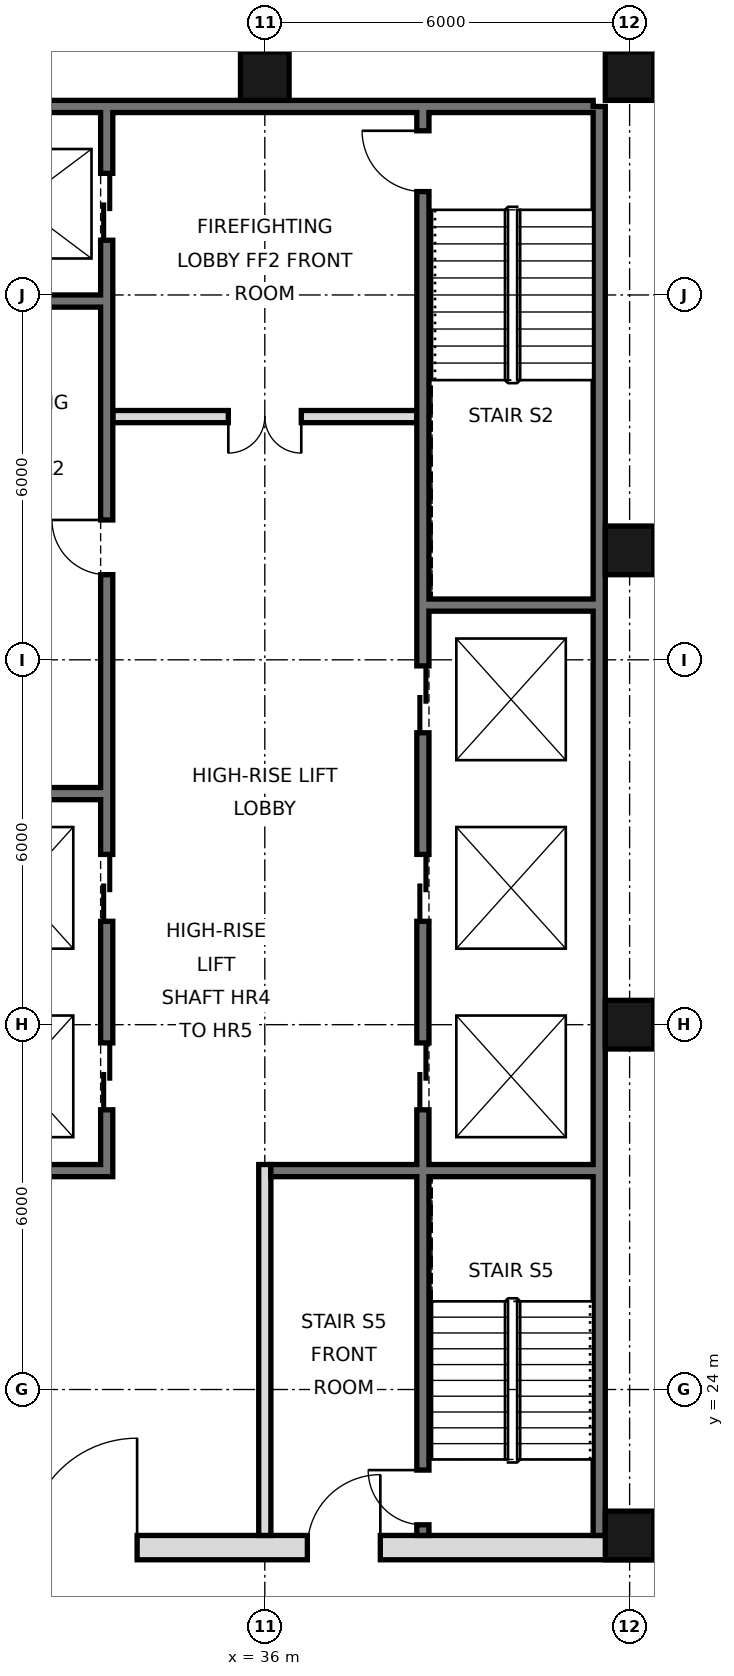
"""IFC4 building model, lengths in metres.
Left out: names, types, materials, properties, quantities, classifications, styles, units other than length and angle.
Written with IfcOpenShell. Run it as: python <this file> out.ifc"""

import sys

from ifc_helpers import new_model, si_unit, direction, frame, frame_2d, origin, origin_2d, place, context, subcontext, project, spatial, rectangle, hollow_rectangle, extrude, element, fill, save


model = new_model("IFC4")
c1 = context("Model", 3, precision=1e-05, world=origin(), true_north=direction((0.0, 1.0)))
c2 = subcontext(c1, "Body", "Model", "MODEL_VIEW")
j1 = project(units=[si_unit("LENGTHUNIT", "METRE"), si_unit("PLANEANGLEUNIT", "RADIAN")], contexts=[c1])
p1 = place(None, origin())
s1 = spatial("IfcSite", under=j1, at=p1, CompositionType="ELEMENT")
p2 = place(p1, origin())
s2 = spatial("IfcBuilding", under=s1, at=p2, CompositionType="ELEMENT")
p3 = place(p2, frame((0.0, 0.0, 219.0)))
s3 = spatial("IfcBuildingStorey", under=s2, at=p3, CompositionType="ELEMENT", Elevation=219.0)
for number, where, z_axis, x_axis in (
    (1, (36.0, 45.6, 0.0), (0.0, 0.0, 1.0), (1.0, 0.0, 0.0)),
    (2, (42.0, 21.6, 0.0), (0.0, 0.0, 1.0), (1.0, 0.0, 0.0)),
    (3, (42.0, 30.0, 0.0), (0.0, 0.0, 1.0), (1.0, 0.0, 0.0)),
    (4, (42.0, 37.8, 0.0), (0.0, 0.0, 1.0), (1.0, 0.0, 0.0)),
    (5, (42.0, 45.6, 0.0), (0.0, 0.0, 1.0), (1.0, 0.0, 0.0)),
):
    element("IfcColumn", number, at=place(p3, frame(where, z_axis=z_axis, x_axis=x_axis)), inside=s3, PredefinedType="COLUMN", context=c2, shape_type="SweptSolid", body=[
        extrude(hollow_rectangle(XDim=0.8, YDim=0.8, WallThickness=0.04, at=origin_2d()), origin(), (0.0, 0.0, 1.0), 3.6),
    ])
p4 = place(p3, frame((41.5, 21.6, 0.0), z_axis=(0.0, 0.0, 1.0), x_axis=(0.0, 1.0, 0.0)))
e6 = element("IfcWall", 6, at=p4, inside=s3, PredefinedType="SOLIDWALL", context=c2, shape_type="SweptSolid", body=[
    extrude(rectangle(XDim=23.5, YDim=0.2, at=frame_2d((11.75, 0.0))), origin(), (0.0, 0.0, 1.0), 3.42),
])
p5 = place(p3, frame((6.6, 45.1, 0.0), z_axis=(0.0, 0.0, 1.0), x_axis=(1.0, 0.0, 0.0)))
e7 = element("IfcWall", 7, at=p5, inside=s3, PredefinedType="SOLIDWALL", context=c2, shape_type="SweptSolid", body=[
    extrude(rectangle(XDim=34.8, YDim=0.2, at=frame_2d((17.4, 0.0))), origin(), (0.0, 0.0, 1.0), 3.42),
])
p6 = place(p3, frame((5.6, 21.4, 0.0), z_axis=(0.0, 0.0, 1.0), x_axis=(1.0, 0.0, 0.0)))
e8 = element("IfcWall", 8, at=p6, inside=s3, PredefinedType="SOLIDWALL", context=c2, shape_type="SweptSolid", body=[
    extrude(rectangle(XDim=36.8, YDim=0.4, at=frame_2d((18.4, 0.0))), origin(), (0.0, 0.0, 1.0), 3.42),
])
p7 = place(p6, frame((8.5, 0.0, 0.0)))
e9 = element("IfcOpeningElement", 9, at=p7, cuts=e8, PredefinedType="OPENING", context=c2, shape_type="SweptSolid", body=[
    extrude(rectangle(XDim=1.8, YDim=2.1, at=frame_2d((0.9, 1.05))), frame((0.0, 0.21, 0.0), z_axis=(0.0, -1.0, 0.0), x_axis=(1.0, 0.0, 0.0)), (0.0, 0.0, 1.0), 0.42),
])
p8 = place(p6, frame((17.5, 0.0, 0.0)))
e10 = element("IfcOpeningElement", 10, at=p8, cuts=e8, PredefinedType="OPENING", context=c2, shape_type="SweptSolid", body=[
    extrude(rectangle(XDim=1.8, YDim=2.1, at=frame_2d((0.9, 1.05))), frame((0.0, 0.21, 0.0), z_axis=(0.0, -1.0, 0.0), x_axis=(1.0, 0.0, 0.0)), (0.0, 0.0, 1.0), 0.42),
])
p9 = place(p6, frame((26.5, 0.0, 0.0)))
e11 = element("IfcOpeningElement", 11, at=p9, cuts=e8, PredefinedType="OPENING", context=c2, shape_type="SweptSolid", body=[
    extrude(rectangle(XDim=1.8, YDim=2.1, at=frame_2d((0.9, 1.05))), frame((0.0, 0.21, 0.0), z_axis=(0.0, -1.0, 0.0), x_axis=(1.0, 0.0, 0.0)), (0.0, 0.0, 1.0), 0.42),
])
p10 = place(p6, frame((4.5, 0.0, 0.0)))
e12 = element("IfcOpeningElement", 12, at=p10, cuts=e8, PredefinedType="OPENING", context=c2, shape_type="SweptSolid", body=[
    extrude(rectangle(XDim=1.2, YDim=2.1, at=frame_2d((0.6, 1.05))), frame((0.0, 0.21, 0.0), z_axis=(0.0, -1.0, 0.0), x_axis=(1.0, 0.0, 0.0)), (0.0, 0.0, 1.0), 0.42),
])
p11 = place(p6, frame((31.1, 0.0, 0.0)))
e13 = element("IfcOpeningElement", 13, at=p11, cuts=e8, PredefinedType="OPENING", context=c2, shape_type="SweptSolid", body=[
    extrude(rectangle(XDim=1.2, YDim=2.1, at=frame_2d((0.6, 1.05))), frame((0.0, 0.21, 0.0), z_axis=(0.0, -1.0, 0.0), x_axis=(1.0, 0.0, 0.0)), (0.0, 0.0, 1.0), 0.42),
])
p12 = place(p3, frame((33.4, 27.5, 0.0), z_axis=(0.0, 0.0, 1.0), x_axis=(0.0, 1.0, 0.0)))
e14 = element("IfcWall", 14, at=p12, inside=s3, PredefinedType="SOLIDWALL", context=c2, shape_type="SweptSolid", body=[
    extrude(rectangle(XDim=17.5, YDim=0.2, at=frame_2d((8.75, 0.0))), origin(), (0.0, 0.0, 1.0), 3.42),
])
p13 = place(p12, frame((1.1, 0.0, 0.0)))
e15 = element("IfcOpeningElement", 15, at=p13, cuts=e14, PredefinedType="OPENING", context=c2, shape_type="SweptSolid", body=[
    extrude(rectangle(XDim=1.1, YDim=2.1, at=frame_2d((0.55, 1.05))), frame((0.0, 0.11, 0.0), z_axis=(0.0, -1.0, 0.0), x_axis=(1.0, 0.0, 0.0)), (0.0, 0.0, 1.0), 0.22),
])
p14 = place(p12, frame((4.2, 0.0, 0.0)))
e16 = element("IfcOpeningElement", 16, at=p14, cuts=e14, PredefinedType="OPENING", context=c2, shape_type="SweptSolid", body=[
    extrude(rectangle(XDim=1.1, YDim=2.1, at=frame_2d((0.55, 1.05))), frame((0.0, 0.11, 0.0), z_axis=(0.0, -1.0, 0.0), x_axis=(1.0, 0.0, 0.0)), (0.0, 0.0, 1.0), 0.22),
])
p15 = place(p12, frame((15.4, 0.0, 0.0)))
e17 = element("IfcOpeningElement", 17, at=p15, cuts=e14, PredefinedType="OPENING", context=c2, shape_type="SweptSolid", body=[
    extrude(rectangle(XDim=1.1, YDim=2.1, at=frame_2d((0.55, 1.05))), frame((0.0, 0.11, 0.0), z_axis=(0.0, -1.0, 0.0), x_axis=(1.0, 0.0, 0.0)), (0.0, 0.0, 1.0), 0.22),
])
p16 = place(p12, frame((9.9, 0.0, 0.0)))
e18 = element("IfcOpeningElement", 18, at=p16, cuts=e14, PredefinedType="OPENING", context=c2, shape_type="SweptSolid", body=[
    extrude(rectangle(XDim=0.9, YDim=2.1, at=frame_2d((0.45, 1.05))), frame((0.0, 0.11, 0.0), z_axis=(0.0, -1.0, 0.0), x_axis=(1.0, 0.0, 0.0)), (0.0, 0.0, 1.0), 0.22),
])
p17 = place(p3, frame((36.0, 21.6, 0.0), z_axis=(0.0, 0.0, 1.0), x_axis=(0.0, 1.0, 0.0)))
e19 = element("IfcWall", 19, at=p17, inside=s3, PredefinedType="PARTITIONING", context=c2, shape_type="SweptSolid", body=[
    extrude(rectangle(XDim=6.1, YDim=0.2, at=frame_2d((3.05, 0.0))), origin(), (0.0, 0.0, 1.0), 3.42),
])
p18 = place(p3, frame((38.6, 21.6, 0.0), z_axis=(0.0, 0.0, 1.0), x_axis=(0.0, 1.0, 0.0)))
e20 = element("IfcWall", 20, at=p18, inside=s3, PredefinedType="SOLIDWALL", context=c2, shape_type="SweptSolid", body=[
    extrude(rectangle(XDim=23.4, YDim=0.2, at=frame_2d((11.7, 0.0))), origin(), (0.0, 0.0, 1.0), 3.42),
])
p19 = place(p18, frame((7.0, 0.0, 0.0)))
e21 = element("IfcOpeningElement", 21, at=p19, cuts=e20, PredefinedType="OPENING", context=c2, shape_type="SweptSolid", body=[
    extrude(rectangle(XDim=1.1, YDim=2.1, at=frame_2d((0.55, 1.05))), frame((0.0, 0.11, 0.0), z_axis=(0.0, -1.0, 0.0), x_axis=(1.0, 0.0, 0.0)), (0.0, 0.0, 1.0), 0.22),
])
p20 = place(p18, frame((10.1, 0.0, 0.0)))
e22 = element("IfcOpeningElement", 22, at=p20, cuts=e20, PredefinedType="OPENING", context=c2, shape_type="SweptSolid", body=[
    extrude(rectangle(XDim=1.1, YDim=2.1, at=frame_2d((0.55, 1.05))), frame((0.0, 0.11, 0.0), z_axis=(0.0, -1.0, 0.0), x_axis=(1.0, 0.0, 0.0)), (0.0, 0.0, 1.0), 0.22),
])
p21 = place(p18, frame((13.2, 0.0, 0.0)))
e23 = element("IfcOpeningElement", 23, at=p21, cuts=e20, PredefinedType="OPENING", context=c2, shape_type="SweptSolid", body=[
    extrude(rectangle(XDim=1.1, YDim=2.1, at=frame_2d((0.55, 1.05))), frame((0.0, 0.11, 0.0), z_axis=(0.0, -1.0, 0.0), x_axis=(1.0, 0.0, 0.0)), (0.0, 0.0, 1.0), 0.22),
])
p22 = place(p18, frame((22.1, 0.0, 0.0)))
e24 = element("IfcOpeningElement", 24, at=p22, cuts=e20, PredefinedType="OPENING", context=c2, shape_type="SweptSolid", body=[
    extrude(rectangle(XDim=1.0, YDim=2.1, at=frame_2d((0.5, 1.05))), frame((0.0, 0.11, 0.0), z_axis=(0.0, -1.0, 0.0), x_axis=(1.0, 0.0, 0.0)), (0.0, 0.0, 1.0), 0.22),
])
p23 = place(p18, frame((0.175, 0.0, 0.0)))
e25 = element("IfcOpeningElement", 25, at=p23, cuts=e20, PredefinedType="OPENING", context=c2, shape_type="SweptSolid", body=[
    extrude(rectangle(XDim=0.9, YDim=2.1, at=frame_2d((0.45, 1.05))), frame((0.0, 0.11, 0.0), z_axis=(0.0, -1.0, 0.0), x_axis=(1.0, 0.0, 0.0)), (0.0, 0.0, 1.0), 0.22),
])
p24 = place(p3, frame((30.6, 27.6, 0.0), z_axis=(0.0, 0.0, 1.0), x_axis=(1.0, 0.0, 0.0)))
e26 = element("IfcWall", 26, at=p24, inside=s3, PredefinedType="SOLIDWALL", context=c2, shape_type="SweptSolid", body=[
    extrude(rectangle(XDim=2.7, YDim=0.2, at=frame_2d((1.35, 0.0))), origin(), (0.0, 0.0, 1.0), 3.42),
])
p25 = place(p3, frame((36.1, 27.6, 0.0), z_axis=(0.0, 0.0, 1.0), x_axis=(1.0, 0.0, 0.0)))
e27 = element("IfcWall", 27, at=p25, inside=s3, PredefinedType="SOLIDWALL", context=c2, shape_type="SweptSolid", body=[
    extrude(rectangle(XDim=5.3, YDim=0.2, at=frame_2d((2.65, 0.0))), origin(), (0.0, 0.0, 1.0), 3.42),
])
for number, where, z_axis, x_axis in (
    (28, (30.6, 33.8, 0.0), (0.0, 0.0, 1.0), (1.0, 0.0, 0.0)),
    (29, (38.7, 36.9, 0.0), (0.0, 0.0, 1.0), (1.0, 0.0, 0.0)),
):
    element("IfcWall", number, at=place(p3, frame(where, z_axis=z_axis, x_axis=x_axis)), inside=s3, PredefinedType="SOLIDWALL", context=c2, shape_type="SweptSolid", body=[
        extrude(rectangle(XDim=2.7, YDim=0.2, at=frame_2d((1.35, 0.0))), origin(), (0.0, 0.0, 1.0), 3.42),
    ])
p26 = place(p3, frame((33.5, 40.0, 0.0), z_axis=(0.0, 0.0, 1.0), x_axis=(1.0, 0.0, 0.0)))
e30 = element("IfcWall", 30, at=p26, inside=s3, PredefinedType="PARTITIONING", context=c2, shape_type="SweptSolid", body=[
    extrude(rectangle(XDim=5.0, YDim=0.2, at=frame_2d((2.5, 0.0))), origin(), (0.0, 0.0, 1.0), 3.42),
])
p27 = place(p26, frame((1.9, 0.0, 0.0)))
e31 = element("IfcOpeningElement", 31, at=p27, cuts=e30, PredefinedType="OPENING", context=c2, shape_type="SweptSolid", body=[
    extrude(rectangle(XDim=1.2, YDim=2.1, at=frame_2d((0.6, 1.05))), frame((0.0, 0.11, 0.0), z_axis=(0.0, -1.0, 0.0), x_axis=(1.0, 0.0, 0.0)), (0.0, 0.0, 1.0), 0.22),
])
p28 = place(p3, frame((30.6, 41.9, 0.0), z_axis=(0.0, 0.0, 1.0), x_axis=(1.0, 0.0, 0.0)))
e32 = element("IfcWall", 32, at=p28, inside=s3, PredefinedType="SOLIDWALL", context=c2, shape_type="SweptSolid", body=[
    extrude(rectangle(XDim=2.7, YDim=0.2, at=frame_2d((1.35, 0.0))), origin(), (0.0, 0.0, 1.0), 3.42),
])
p29 = place(p9, frame((1.8, 0.0, 0.0), z_axis=(0.0, 0.0, 1.0), x_axis=(-1.0, 0.0, 0.0)))
e33 = element("IfcDoor", 33, at=p29, inside=s3, OperationType="SINGLE_SWING_LEFT", PredefinedType="DOOR", context=c2, shape_type="SweptSolid", body=[
    extrude(rectangle(XDim=1.8, YDim=2.1, at=frame_2d((0.9, 1.05))), frame((0.0, 0.025, 0.0), z_axis=(0.0, -1.0, 0.0), x_axis=(1.0, 0.0, 0.0)), (0.0, 0.0, 1.0), 0.05),
])
fill(e11, e33)
p30 = place(p11, frame((1.2, 0.0, 0.0), z_axis=(0.0, 0.0, 1.0), x_axis=(-1.0, 0.0, 0.0)))
e34 = element("IfcDoor", 34, at=p30, inside=s3, OperationType="SINGLE_SWING_LEFT", PredefinedType="DOOR", context=c2, shape_type="SweptSolid", body=[
    extrude(rectangle(XDim=1.2, YDim=2.1, at=frame_2d((0.6, 1.05))), frame((0.0, 0.025, 0.0), z_axis=(0.0, -1.0, 0.0), x_axis=(1.0, 0.0, 0.0)), (0.0, 0.0, 1.0), 0.05),
])
fill(e13, e34)
p31 = place(p27, frame((1.2, 0.0, 0.0), z_axis=(0.0, 0.0, 1.0), x_axis=(-1.0, 0.0, 0.0)))
e35 = element("IfcDoor", 35, at=p31, inside=s3, OperationType="DOUBLE_DOOR_SINGLE_SWING", PredefinedType="DOOR", context=c2, shape_type="SweptSolid", body=[
    extrude(rectangle(XDim=1.2, YDim=2.1, at=frame_2d((0.6, 1.05))), frame((0.0, 0.025, 0.0), z_axis=(0.0, -1.0, 0.0), x_axis=(1.0, 0.0, 0.0)), (0.0, 0.0, 1.0), 0.05),
])
fill(e31, e35)
p32 = place(p19, origin())
e36 = element("IfcDoor", 36, at=p32, inside=s3, OperationType="DOUBLE_DOOR_SLIDING", PredefinedType="DOOR", context=c2, shape_type="SweptSolid", body=[
    extrude(rectangle(XDim=1.1, YDim=2.1, at=frame_2d((0.55, 1.05))), frame((0.0, 0.025, 0.0), z_axis=(0.0, -1.0, 0.0), x_axis=(1.0, 0.0, 0.0)), (0.0, 0.0, 1.0), 0.05),
])
fill(e21, e36)
p33 = place(p20, origin())
e37 = element("IfcDoor", 37, at=p33, inside=s3, OperationType="DOUBLE_DOOR_SLIDING", PredefinedType="DOOR", context=c2, shape_type="SweptSolid", body=[
    extrude(rectangle(XDim=1.1, YDim=2.1, at=frame_2d((0.55, 1.05))), frame((0.0, 0.025, 0.0), z_axis=(0.0, -1.0, 0.0), x_axis=(1.0, 0.0, 0.0)), (0.0, 0.0, 1.0), 0.05),
])
fill(e22, e37)
p34 = place(p21, origin())
e38 = element("IfcDoor", 38, at=p34, inside=s3, OperationType="DOUBLE_DOOR_SLIDING", PredefinedType="DOOR", context=c2, shape_type="SweptSolid", body=[
    extrude(rectangle(XDim=1.1, YDim=2.1, at=frame_2d((0.55, 1.05))), frame((0.0, 0.025, 0.0), z_axis=(0.0, -1.0, 0.0), x_axis=(1.0, 0.0, 0.0)), (0.0, 0.0, 1.0), 0.05),
])
fill(e23, e38)
p35 = place(p13, origin())
e39 = element("IfcDoor", 39, at=p35, inside=s3, OperationType="DOUBLE_DOOR_SLIDING", PredefinedType="DOOR", context=c2, shape_type="SweptSolid", body=[
    extrude(rectangle(XDim=1.1, YDim=2.1, at=frame_2d((0.55, 1.05))), frame((0.0, 0.025, 0.0), z_axis=(0.0, -1.0, 0.0), x_axis=(1.0, 0.0, 0.0)), (0.0, 0.0, 1.0), 0.05),
])
fill(e15, e39)
p36 = place(p14, origin())
e40 = element("IfcDoor", 40, at=p36, inside=s3, OperationType="DOUBLE_DOOR_SLIDING", PredefinedType="DOOR", context=c2, shape_type="SweptSolid", body=[
    extrude(rectangle(XDim=1.1, YDim=2.1, at=frame_2d((0.55, 1.05))), frame((0.0, 0.025, 0.0), z_axis=(0.0, -1.0, 0.0), x_axis=(1.0, 0.0, 0.0)), (0.0, 0.0, 1.0), 0.05),
])
fill(e16, e40)
p37 = place(p15, origin())
e41 = element("IfcDoor", 41, at=p37, inside=s3, OperationType="DOUBLE_DOOR_SLIDING", PredefinedType="DOOR", context=c2, shape_type="SweptSolid", body=[
    extrude(rectangle(XDim=1.1, YDim=2.1, at=frame_2d((0.55, 1.05))), frame((0.0, 0.025, 0.0), z_axis=(0.0, -1.0, 0.0), x_axis=(1.0, 0.0, 0.0)), (0.0, 0.0, 1.0), 0.05),
])
fill(e17, e41)
p38 = place(p22, frame((1.0, 0.0, 0.0), z_axis=(0.0, 0.0, 1.0), x_axis=(-1.0, 0.0, 0.0)))
e42 = element("IfcDoor", 42, at=p38, inside=s3, OperationType="SINGLE_SWING_LEFT", PredefinedType="DOOR", context=c2, shape_type="SweptSolid", body=[
    extrude(rectangle(XDim=1.0, YDim=2.1, at=frame_2d((0.5, 1.05))), frame((0.0, 0.025, 0.0), z_axis=(0.0, -1.0, 0.0), x_axis=(1.0, 0.0, 0.0)), (0.0, 0.0, 1.0), 0.05),
])
fill(e24, e42)
p39 = place(p23, frame((0.9, 0.0, 0.0), z_axis=(0.0, 0.0, 1.0), x_axis=(-1.0, 0.0, 0.0)))
e43 = element("IfcDoor", 43, at=p39, inside=s3, OperationType="SINGLE_SWING_LEFT", PredefinedType="DOOR", context=c2, shape_type="SweptSolid", body=[
    extrude(rectangle(XDim=0.9, YDim=2.1, at=frame_2d((0.45, 1.05))), frame((0.0, 0.025, 0.0), z_axis=(0.0, -1.0, 0.0), x_axis=(1.0, 0.0, 0.0)), (0.0, 0.0, 1.0), 0.05),
])
fill(e25, e43)
p40 = place(p16, frame((0.9, 0.0, 0.0), z_axis=(0.0, 0.0, 1.0), x_axis=(-1.0, 0.0, 0.0)))
e44 = element("IfcDoor", 44, at=p40, inside=s3, OperationType="SINGLE_SWING_LEFT", PredefinedType="DOOR", context=c2, shape_type="SweptSolid", body=[
    extrude(rectangle(XDim=0.9, YDim=2.1, at=frame_2d((0.45, 1.05))), frame((0.0, 0.025, 0.0), z_axis=(0.0, -1.0, 0.0), x_axis=(1.0, 0.0, 0.0)), (0.0, 0.0, 1.0), 0.05),
])
fill(e18, e44)
save(model, sys.argv[1])
